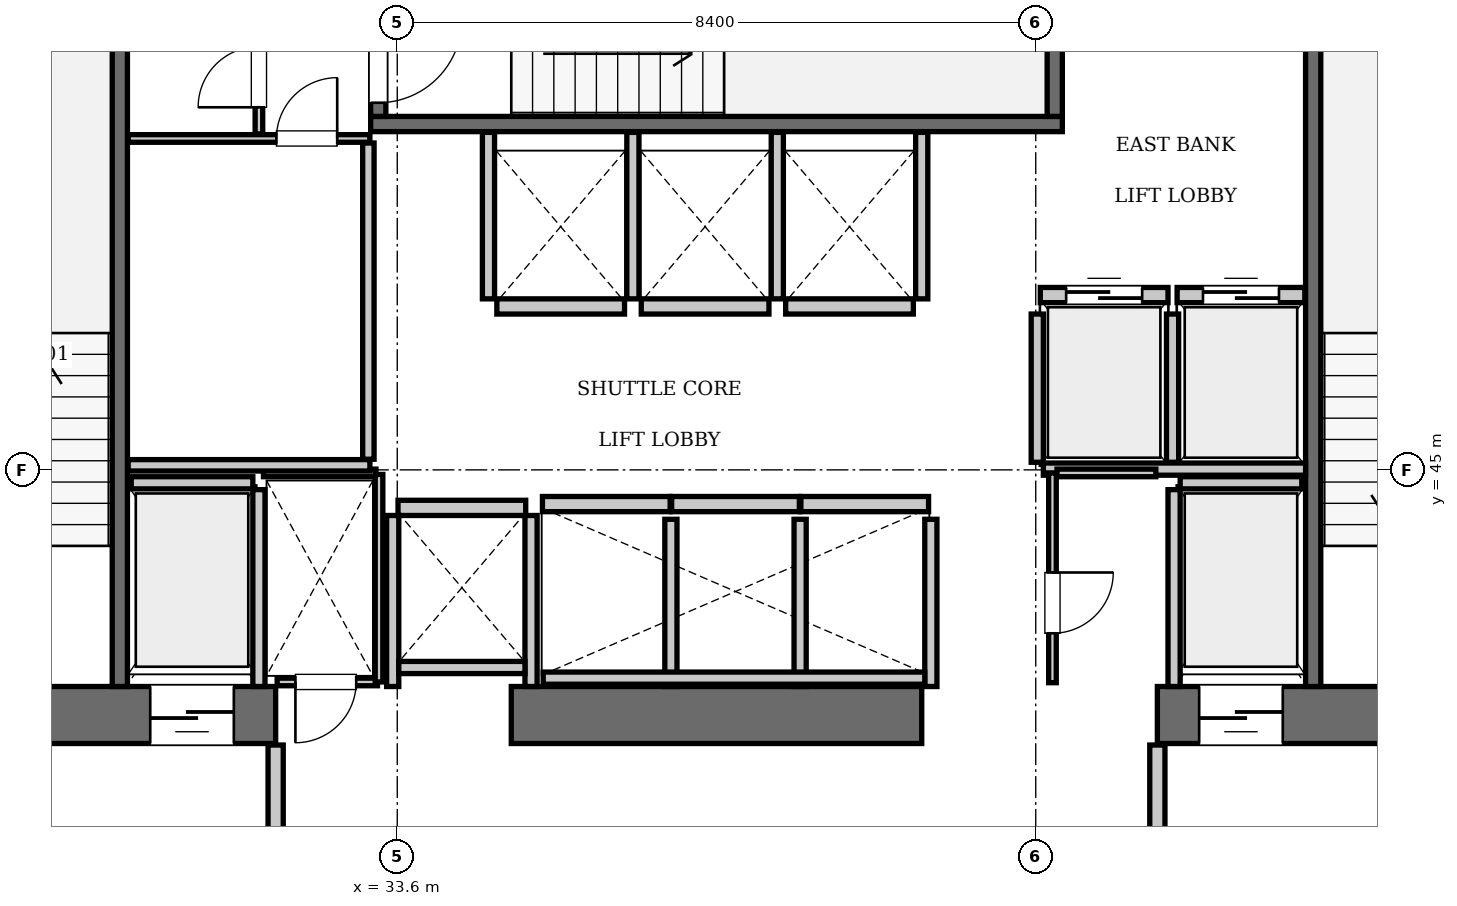
"""IFC4 building model, lengths in metres.
Left out: names, types, materials, properties, quantities, classifications, styles, units other than length and angle.
Written with IfcOpenShell. Run it as: python <this file> out.ifc"""

import sys

from ifc_helpers import new_model, si_unit, direction, frame, frame_2d, origin, place, context, subcontext, project, spatial, rectangle, extrude, element, fill, save


model = new_model("IFC4")
c1 = context("Model", 3, precision=1e-05, world=origin(), true_north=direction((0.0, 1.0)))
c2 = subcontext(c1, "Body", "Model", "MODEL_VIEW")
j1 = project(units=[si_unit("LENGTHUNIT", "METRE"), si_unit("PLANEANGLEUNIT", "RADIAN")], contexts=[c1])
p1 = place(None, origin())
s1 = spatial("IfcSite", under=j1, at=p1, CompositionType="ELEMENT")
p2 = place(p1, origin())
s2 = spatial("IfcBuilding", under=s1, at=p2, CompositionType="ELEMENT")
p3 = place(p2, frame((0.0, 0.0, 223.65)))
s3 = spatial("IfcBuildingStorey", under=s2, at=p3, CompositionType="ELEMENT", Elevation=223.65)
p4 = place(p3, frame((25.2, 41.775, 0.0), z_axis=(0.0, 0.0, 1.0), x_axis=(1.0, 0.0, 0.0)))
e1 = element("IfcWall", 1, at=p4, inside=s3, PredefinedType="SHEAR", context=c2, shape_type="SweptSolid", body=[
    extrude(rectangle(XDim=6.8, YDim=0.75, at=frame_2d((3.4, 0.0))), origin(), (0.0, 0.0, 1.0), 3.85),
])
p5 = place(p4, frame((1.65, 0.0, 0.0)))
e2 = element("IfcOpeningElement", 2, at=p5, cuts=e1, PredefinedType="OPENING", context=c2, shape_type="SweptSolid", body=[
    extrude(rectangle(XDim=1.15, YDim=2.15, at=frame_2d((0.575, 1.075))), frame((0.0, 0.385, 0.0), z_axis=(0.0, -1.0, 0.0), x_axis=(1.0, 0.0, 0.0)), (0.0, 0.0, 1.0), 0.77),
])
p6 = place(p4, frame((5.15, 0.0, 0.0)))
e3 = element("IfcOpeningElement", 3, at=p6, cuts=e1, PredefinedType="OPENING", context=c2, shape_type="SweptSolid", body=[
    extrude(rectangle(XDim=1.1, YDim=2.2, at=frame_2d((0.55, 1.1))), frame((0.0, 0.385, 0.0), z_axis=(0.0, -1.0, 0.0), x_axis=(1.0, 0.0, 0.0)), (0.0, 0.0, 1.0), 0.77),
])
p7 = place(p3, frame((35.1, 41.775, 0.0), z_axis=(0.0, 0.0, 1.0), x_axis=(1.0, 0.0, 0.0)))
e4 = element("IfcWall", 4, at=p7, inside=s3, PredefinedType="SHEAR", context=c2, shape_type="SweptSolid", body=[
    extrude(rectangle(XDim=5.4, YDim=0.75, at=frame_2d((2.7, 0.0))), origin(), (0.0, 0.0, 1.0), 3.85),
])
p8 = place(p3, frame((43.6, 41.775, 0.0), z_axis=(0.0, 0.0, 1.0), x_axis=(1.0, 0.0, 0.0)))
e5 = element("IfcWall", 5, at=p8, inside=s3, PredefinedType="SHEAR", context=c2, shape_type="SweptSolid", body=[
    extrude(rectangle(XDim=6.8, YDim=0.75, at=frame_2d((3.4, 0.0))), origin(), (0.0, 0.0, 1.0), 3.85),
])
p9 = place(p8, frame((3.9, 0.0, 0.0)))
e6 = element("IfcOpeningElement", 6, at=p9, cuts=e5, PredefinedType="OPENING", context=c2, shape_type="SweptSolid", body=[
    extrude(rectangle(XDim=1.15, YDim=2.15, at=frame_2d((0.575, 1.075))), frame((0.0, 0.385, 0.0), z_axis=(0.0, -1.0, 0.0), x_axis=(1.0, 0.0, 0.0)), (0.0, 0.0, 1.0), 0.77),
])
p10 = place(p8, frame((0.55, 0.0, 0.0)))
e7 = element("IfcOpeningElement", 7, at=p10, cuts=e5, PredefinedType="OPENING", context=c2, shape_type="SweptSolid", body=[
    extrude(rectangle(XDim=1.1, YDim=2.2, at=frame_2d((0.55, 1.1))), frame((0.0, 0.385, 0.0), z_axis=(0.0, -1.0, 0.0), x_axis=(1.0, 0.0, 0.0)), (0.0, 0.0, 1.0), 0.77),
])
p11 = place(p3, frame((29.95, 42.15, 0.0), z_axis=(0.0, 0.0, 1.0), x_axis=(0.0, 1.0, 0.0)))
e8 = element("IfcWall", 8, at=p11, inside=s3, PredefinedType="SOLIDWALL", context=c2, shape_type="SweptSolid", body=[
    extrude(rectangle(XDim=9.0, YDim=0.2, at=frame_2d((4.5, 0.0))), origin(), (0.0, 0.0, 1.0), 3.55),
])
p12 = place(p3, frame((33.25, 49.55, 0.0), z_axis=(0.0, 0.0, 1.0), x_axis=(1.0, 0.0, 0.0)))
e9 = element("IfcWall", 9, at=p12, inside=s3, PredefinedType="SOLIDWALL", context=c2, shape_type="SweptSolid", body=[
    extrude(rectangle(XDim=9.1, YDim=0.2, at=frame_2d((4.55, 0.0))), origin(), (0.0, 0.0, 1.0), 3.55),
])
p13 = place(p3, frame((42.25, 49.65, 0.0), z_axis=(0.0, 0.0, 1.0), x_axis=(0.0, 1.0, 0.0)))
e10 = element("IfcWall", 10, at=p13, inside=s3, PredefinedType="SOLIDWALL", context=c2, shape_type="SweptSolid", body=[
    extrude(rectangle(XDim=3.6, YDim=0.2, at=frame_2d((1.8, 0.0))), origin(), (0.0, 0.0, 1.0), 3.55),
])
p14 = place(p3, frame((33.35, 49.65, 0.0), z_axis=(0.0, 0.0, 1.0), x_axis=(0.0, 1.0, 0.0)))
e11 = element("IfcWall", 11, at=p14, inside=s3, PredefinedType="SOLIDWALL", context=c2, shape_type="SweptSolid", body=[
    extrude(rectangle(XDim=3.6, YDim=0.2, at=frame_2d((1.8, 0.0))), origin(), (0.0, 0.0, 1.0), 3.55),
])
p15 = place(p14, frame((0.18, 0.0, 0.0)))
e12 = element("IfcOpeningElement", 12, at=p15, cuts=e11, PredefinedType="OPENING", context=c2, shape_type="SweptSolid", body=[
    extrude(rectangle(XDim=1.1, YDim=2.15, at=frame_2d((0.55, 1.075))), frame((0.0, 0.11, 0.0), z_axis=(0.0, -1.0, 0.0), x_axis=(1.0, 0.0, 0.0)), (0.0, 0.0, 1.0), 0.22),
])
p16 = place(p3, frame((45.65, 42.15, 0.0), z_axis=(0.0, 0.0, 1.0), x_axis=(0.0, 1.0, 0.0)))
e13 = element("IfcWall", 13, at=p16, inside=s3, PredefinedType="SOLIDWALL", context=c2, shape_type="SweptSolid", body=[
    extrude(rectangle(XDim=9.0, YDim=0.2, at=frame_2d((4.5, 0.0))), origin(), (0.0, 0.0, 1.0), 3.55),
])
p17 = place(p3, frame((42.06, 47.3, 0.0), z_axis=(0.0, 0.0, 1.0), x_axis=(1.0, 0.0, 0.0)))
e14 = element("IfcWall", 14, at=p17, inside=s3, PredefinedType="SOLIDWALL", context=c2, shape_type="SweptSolid", body=[
    extrude(rectangle(XDim=1.68, YDim=0.2, at=frame_2d((0.84, 0.0))), origin(), (0.0, 0.0, 1.0), 3.55),
])
p18 = place(p17, frame((0.34, 0.0, 0.0)))
e15 = element("IfcOpeningElement", 15, at=p18, cuts=e14, PredefinedType="OPENING", context=c2, shape_type="SweptSolid", body=[
    extrude(rectangle(XDim=1.0, YDim=2.15, at=frame_2d((0.5, 1.075))), frame((0.0, 0.11, 0.0), z_axis=(0.0, -1.0, 0.0), x_axis=(1.0, 0.0, 0.0)), (0.0, 0.0, 1.0), 0.22),
])
p19 = place(p3, frame((43.86, 47.3, 0.0), z_axis=(0.0, 0.0, 1.0), x_axis=(1.0, 0.0, 0.0)))
e16 = element("IfcWall", 16, at=p19, inside=s3, PredefinedType="SOLIDWALL", context=c2, shape_type="SweptSolid", body=[
    extrude(rectangle(XDim=1.68, YDim=0.2, at=frame_2d((0.84, 0.0))), origin(), (0.0, 0.0, 1.0), 3.55),
])
p20 = place(p19, frame((0.34, 0.0, 0.0)))
e17 = element("IfcOpeningElement", 17, at=p20, cuts=e16, PredefinedType="OPENING", context=c2, shape_type="SweptSolid", body=[
    extrude(rectangle(XDim=1.0, YDim=2.15, at=frame_2d((0.5, 1.075))), frame((0.0, 0.11, 0.0), z_axis=(0.0, -1.0, 0.0), x_axis=(1.0, 0.0, 0.0)), (0.0, 0.0, 1.0), 0.22),
])
for number, where, z_axis, x_axis in (
    (18, (35.51, 44.55, 0.0), (0.0, 0.0, 1.0), (1.0, 0.0, 0.0)),
    (19, (37.21, 44.55, 0.0), (0.0, 0.0, 1.0), (1.0, 0.0, 0.0)),
):
    element("IfcWall", number, at=place(p3, frame(where, z_axis=z_axis, x_axis=x_axis)), inside=s3, PredefinedType="SOLIDWALL", context=c2, shape_type="SweptSolid", body=[
        extrude(rectangle(XDim=1.68, YDim=0.2, at=frame_2d((0.84, 0.0))), origin(), (0.0, 0.0, 1.0), 3.55),
    ])
for number, where, z_axis, x_axis in (
    (20, (38.91, 44.55, 0.0), (0.0, 0.0, 1.0), (1.0, 0.0, 0.0)),
    (21, (34.91, 47.15, 0.0), (0.0, 0.0, 1.0), (1.0, 0.0, 0.0)),
):
    element("IfcWall", number, at=place(p3, frame(where, z_axis=z_axis, x_axis=x_axis)), inside=s3, PredefinedType="SOLIDWALL", context=c2, shape_type="SweptSolid", body=[
        extrude(rectangle(XDim=1.68, YDim=0.2, at=frame_2d((0.84, 0.0))), origin(), (0.0, 0.0, 1.0), 3.55),
    ])
for number, where, z_axis, x_axis in (
    (22, (36.81, 47.15, 0.0), (0.0, 0.0, 1.0), (1.0, 0.0, 0.0)),
    (23, (38.71, 47.15, 0.0), (0.0, 0.0, 1.0), (1.0, 0.0, 0.0)),
    (24, (33.61, 44.5, 0.0), (0.0, 0.0, 1.0), (1.0, 0.0, 0.0)),
):
    element("IfcWall", number, at=place(p3, frame(where, z_axis=z_axis, x_axis=x_axis)), inside=s3, PredefinedType="SOLIDWALL", context=c2, shape_type="SweptSolid", body=[
        extrude(rectangle(XDim=1.68, YDim=0.2, at=frame_2d((0.84, 0.0))), origin(), (0.0, 0.0, 1.0), 3.55),
    ])
p21 = place(p3, frame((30.1, 44.83, 0.0), z_axis=(0.0, 0.0, 1.0), x_axis=(1.0, 0.0, 0.0)))
e25 = element("IfcWall", 25, at=p21, inside=s3, PredefinedType="SOLIDWALL", context=c2, shape_type="SweptSolid", body=[
    extrude(rectangle(XDim=1.6, YDim=0.16, at=frame_2d((0.8, 0.0))), origin(), (0.0, 0.0, 1.0), 3.55),
])
p22 = place(p3, frame((31.78, 42.15, 0.0), z_axis=(0.0, 0.0, 1.0), x_axis=(0.0, 1.0, 0.0)))
e26 = element("IfcWall", 26, at=p22, inside=s3, PredefinedType="SOLIDWALL", context=c2, shape_type="SweptSolid", body=[
    extrude(rectangle(XDim=2.59, YDim=0.16, at=frame_2d((1.295, 0.0))), origin(), (0.0, 0.0, 1.0), 3.55),
])
p23 = place(p3, frame((43.9, 44.83, 0.0), z_axis=(0.0, 0.0, 1.0), x_axis=(1.0, 0.0, 0.0)))
e27 = element("IfcWall", 27, at=p23, inside=s3, PredefinedType="SOLIDWALL", context=c2, shape_type="SweptSolid", body=[
    extrude(rectangle(XDim=1.6, YDim=0.16, at=frame_2d((0.8, 0.0))), origin(), (0.0, 0.0, 1.0), 3.55),
])
p24 = place(p3, frame((43.82, 42.15, 0.0), z_axis=(0.0, 0.0, 1.0), x_axis=(0.0, 1.0, 0.0)))
e28 = element("IfcWall", 28, at=p24, inside=s3, PredefinedType="SOLIDWALL", context=c2, shape_type="SweptSolid", body=[
    extrude(rectangle(XDim=2.59, YDim=0.16, at=frame_2d((1.295, 0.0))), origin(), (0.0, 0.0, 1.0), 3.55),
])
for number, where, z_axis, x_axis in (
    (29, (42.02, 45.1, 0.0), (0.0, 0.0, 1.0), (0.0, 1.0, 0.0)),
    (30, (43.8, 45.1, 0.0), (0.0, 0.0, 1.0), (0.0, 1.0, 0.0)),
):
    element("IfcWall", number, at=place(p3, frame(where, z_axis=z_axis, x_axis=x_axis)), inside=s3, PredefinedType="SOLIDWALL", context=c2, shape_type="SweptSolid", body=[
        extrude(rectangle(XDim=1.95, YDim=0.16, at=frame_2d((0.975, 0.0))), origin(), (0.0, 0.0, 1.0), 3.55),
    ])
p25 = place(p3, frame((42.1, 45.01, 0.0), z_axis=(0.0, 0.0, 1.0), x_axis=(1.0, 0.0, 0.0)))
e31 = element("IfcWall", 31, at=p25, inside=s3, PredefinedType="SOLIDWALL", context=c2, shape_type="SweptSolid", body=[
    extrude(rectangle(XDim=3.45, YDim=0.16, at=frame_2d((1.725, 0.0))), origin(), (0.0, 0.0, 1.0), 3.55),
])
for number, where, z_axis, x_axis in (
    (32, (37.2, 42.15, 0.0), (0.0, 0.0, 1.0), (0.0, 1.0, 0.0)),
    (33, (38.9, 42.15, 0.0), (0.0, 0.0, 1.0), (0.0, 1.0, 0.0)),
    (34, (40.62, 42.15, 0.0), (0.0, 0.0, 1.0), (0.0, 1.0, 0.0)),
):
    element("IfcWall", number, at=place(p3, frame(where, z_axis=z_axis, x_axis=x_axis)), inside=s3, PredefinedType="SOLIDWALL", context=c2, shape_type="SweptSolid", body=[
        extrude(rectangle(XDim=2.2, YDim=0.16, at=frame_2d((1.1, 0.0))), origin(), (0.0, 0.0, 1.0), 3.55),
    ])
p26 = place(p3, frame((35.52, 42.26, 0.0), z_axis=(0.0, 0.0, 1.0), x_axis=(1.0, 0.0, 0.0)))
e35 = element("IfcWall", 35, at=p26, inside=s3, PredefinedType="SOLIDWALL", context=c2, shape_type="SweptSolid", body=[
    extrude(rectangle(XDim=5.02, YDim=0.16, at=frame_2d((2.51, 0.0))), origin(), (0.0, 0.0, 1.0), 3.55),
])
for number, where, z_axis, x_axis in (
    (36, (34.8, 47.25, 0.0), (0.0, 0.0, 1.0), (0.0, 1.0, 0.0)),
    (37, (36.7, 47.25, 0.0), (0.0, 0.0, 1.0), (0.0, 1.0, 0.0)),
    (38, (38.6, 47.25, 0.0), (0.0, 0.0, 1.0), (0.0, 1.0, 0.0)),
    (39, (40.5, 47.25, 0.0), (0.0, 0.0, 1.0), (0.0, 1.0, 0.0)),
):
    element("IfcWall", number, at=place(p3, frame(where, z_axis=z_axis, x_axis=x_axis)), inside=s3, PredefinedType="SOLIDWALL", context=c2, shape_type="SweptSolid", body=[
        extrude(rectangle(XDim=2.19, YDim=0.16, at=frame_2d((1.095, 0.0))), origin(), (0.0, 0.0, 1.0), 3.55),
    ])
for number, where, z_axis, x_axis in (
    (40, (33.54, 42.15, 0.0), (0.0, 0.0, 1.0), (0.0, 1.0, 0.0)),
    (41, (35.36, 42.15, 0.0), (0.0, 0.0, 1.0), (0.0, 1.0, 0.0)),
):
    element("IfcWall", number, at=place(p3, frame(where, z_axis=z_axis, x_axis=x_axis)), inside=s3, PredefinedType="SOLIDWALL", context=c2, shape_type="SweptSolid", body=[
        extrude(rectangle(XDim=2.25, YDim=0.16, at=frame_2d((1.125, 0.0))), origin(), (0.0, 0.0, 1.0), 3.55),
    ])
p27 = place(p3, frame((33.62, 42.4, 0.0), z_axis=(0.0, 0.0, 1.0), x_axis=(1.0, 0.0, 0.0)))
e42 = element("IfcWall", 42, at=p27, inside=s3, PredefinedType="SOLIDWALL", context=c2, shape_type="SweptSolid", body=[
    extrude(rectangle(XDim=1.66, YDim=0.16, at=frame_2d((0.83, 0.0))), origin(), (0.0, 0.0, 1.0), 3.55),
])
for number, where, z_axis, x_axis in (
    (43, (32.0, 38.31, 0.0), (0.0, 0.0, 1.0), (0.0, 1.0, 0.0)),
    (44, (43.6, 38.31, 0.0), (0.0, 0.0, 1.0), (0.0, 1.0, 0.0)),
):
    element("IfcWall", number, at=place(p3, frame(where, z_axis=z_axis, x_axis=x_axis)), inside=s3, PredefinedType="PARTITIONING", context=c2, shape_type="SweptSolid", body=[
        extrude(rectangle(XDim=3.07, YDim=0.2, at=frame_2d((1.535, 0.0))), origin(), (0.0, 0.0, 1.0), 3.55),
    ])
p28 = place(p3, frame((32.02, 42.21, 0.0), z_axis=(0.0, 0.0, 1.0), x_axis=(1.0, 0.0, 0.0)))
e45 = element("IfcWall", 45, at=p28, inside=s3, PredefinedType="PARTITIONING", context=c2, shape_type="SweptSolid", body=[
    extrude(rectangle(XDim=1.32, YDim=0.1, at=frame_2d((0.66, 0.0))), origin(), (0.0, 0.0, 1.0), 3.55),
])
p29 = place(p28, frame((0.24, 0.0, 0.0)))
e46 = element("IfcOpeningElement", 46, at=p29, cuts=e45, PredefinedType="OPENING", context=c2, shape_type="SweptSolid", body=[
    extrude(rectangle(XDim=0.8, YDim=2.05, at=frame_2d((0.4, 1.025))), frame((0.0, 0.06, 0.0), z_axis=(0.0, -1.0, 0.0), x_axis=(1.0, 0.0, 0.0)), (0.0, 0.0, 1.0), 0.12),
])
p30 = place(p3, frame((31.84, 44.96, 0.0), z_axis=(0.0, 0.0, 1.0), x_axis=(1.0, 0.0, 0.0)))
e47 = element("IfcWall", 47, at=p30, inside=s3, PredefinedType="PARTITIONING", context=c2, shape_type="SweptSolid", body=[
    extrude(rectangle(XDim=1.48, YDim=0.1, at=frame_2d((0.74, 0.0))), origin(), (0.0, 0.0, 1.0), 3.55),
])
p31 = place(p3, frame((33.36, 42.21, 0.0), z_axis=(0.0, 0.0, 1.0), x_axis=(0.0, 1.0, 0.0)))
e48 = element("IfcWall", 48, at=p31, inside=s3, PredefinedType="PARTITIONING", context=c2, shape_type="SweptSolid", body=[
    extrude(rectangle(XDim=2.73, YDim=0.1, at=frame_2d((1.365, 0.0))), origin(), (0.0, 0.0, 1.0), 3.55),
])
p32 = place(p3, frame((42.22, 42.2, 0.0), z_axis=(0.0, 0.0, 1.0), x_axis=(0.0, 1.0, 0.0)))
e49 = element("IfcWall", 49, at=p32, inside=s3, PredefinedType="PARTITIONING", context=c2, shape_type="SweptSolid", body=[
    extrude(rectangle(XDim=2.76, YDim=0.1, at=frame_2d((1.38, 0.0))), origin(), (0.0, 0.0, 1.0), 3.55),
])
p33 = place(p32, frame((0.65, 0.0, 0.0)))
e50 = element("IfcOpeningElement", 50, at=p33, cuts=e49, PredefinedType="OPENING", context=c2, shape_type="SweptSolid", body=[
    extrude(rectangle(XDim=0.8, YDim=2.05, at=frame_2d((0.4, 1.025))), frame((0.0, 0.06, 0.0), z_axis=(0.0, -1.0, 0.0), x_axis=(1.0, 0.0, 0.0)), (0.0, 0.0, 1.0), 0.12),
])
p34 = place(p3, frame((42.28, 44.96, 0.0), z_axis=(0.0, 0.0, 1.0), x_axis=(1.0, 0.0, 0.0)))
e51 = element("IfcWall", 51, at=p34, inside=s3, PredefinedType="PARTITIONING", context=c2, shape_type="SweptSolid", body=[
    extrude(rectangle(XDim=1.3, YDim=0.1, at=frame_2d((0.65, 0.0))), origin(), (0.0, 0.0, 1.0), 3.55),
])
p35 = place(p3, frame((30.06, 45.06, 0.0), z_axis=(0.0, 0.0, 1.0), x_axis=(1.0, 0.0, 0.0)))
e52 = element("IfcWall", 52, at=p35, inside=s3, PredefinedType="PARTITIONING", context=c2, shape_type="SweptSolid", body=[
    extrude(rectangle(XDim=3.18, YDim=0.15, at=frame_2d((1.59, 0.0))), origin(), (0.0, 0.0, 1.0), 3.55),
])
p36 = place(p3, frame((33.22, 45.14, 0.0), z_axis=(0.0, 0.0, 1.0), x_axis=(0.0, 1.0, 0.0)))
e53 = element("IfcWall", 53, at=p36, inside=s3, PredefinedType="PARTITIONING", context=c2, shape_type="SweptSolid", body=[
    extrude(rectangle(XDim=4.16, YDim=0.15, at=frame_2d((2.08, 0.0))), origin(), (0.0, 0.0, 1.0), 3.55),
])
p37 = place(p3, frame((30.06, 49.36, 0.0), z_axis=(0.0, 0.0, 1.0), x_axis=(1.0, 0.0, 0.0)))
e54 = element("IfcWall", 54, at=p37, inside=s3, PredefinedType="PARTITIONING", context=c2, shape_type="SweptSolid", body=[
    extrude(rectangle(XDim=3.18, YDim=0.1, at=frame_2d((1.59, 0.0))), origin(), (0.0, 0.0, 1.0), 3.55),
])
p38 = place(p37, frame((1.95, 0.0, 0.0)))
e55 = element("IfcOpeningElement", 55, at=p38, cuts=e54, PredefinedType="OPENING", context=c2, shape_type="SweptSolid", body=[
    extrude(rectangle(XDim=0.8, YDim=2.05, at=frame_2d((0.4, 1.025))), frame((0.0, 0.06, 0.0), z_axis=(0.0, -1.0, 0.0), x_axis=(1.0, 0.0, 0.0)), (0.0, 0.0, 1.0), 0.12),
])
p39 = place(p3, frame((31.78, 49.42, 0.0), z_axis=(0.0, 0.0, 1.0), x_axis=(0.0, 1.0, 0.0)))
e56 = element("IfcWall", 56, at=p39, inside=s3, PredefinedType="PARTITIONING", context=c2, shape_type="SweptSolid", body=[
    extrude(rectangle(XDim=1.68, YDim=0.1, at=frame_2d((0.84, 0.0))), origin(), (0.0, 0.0, 1.0), 3.55),
])
p40 = place(p39, frame((0.35, 0.0, 0.0)))
e57 = element("IfcOpeningElement", 57, at=p40, cuts=e56, PredefinedType="OPENING", context=c2, shape_type="SweptSolid", body=[
    extrude(rectangle(XDim=0.8, YDim=2.05, at=frame_2d((0.4, 1.025))), frame((0.0, 0.06, 0.0), z_axis=(0.0, -1.0, 0.0), x_axis=(1.0, 0.0, 0.0)), (0.0, 0.0, 1.0), 0.12),
])
p41 = place(p15, frame((1.1, 0.0, 0.0), z_axis=(0.0, 0.0, 1.0), x_axis=(-1.0, 0.0, 0.0)))
e58 = element("IfcDoor", 58, at=p41, inside=s3, OperationType="SINGLE_SWING_LEFT", PredefinedType="DOOR", context=c2, shape_type="SweptSolid", body=[
    extrude(rectangle(XDim=1.1, YDim=2.15, at=frame_2d((0.55, 1.075))), frame((0.0, 0.025, 0.0), z_axis=(0.0, -1.0, 0.0), x_axis=(1.0, 0.0, 0.0)), (0.0, 0.0, 1.0), 0.05),
])
fill(e12, e58)
p42 = place(p18, origin())
e59 = element("IfcDoor", 59, at=p42, inside=s3, OperationType="SLIDING_TO_LEFT", PredefinedType="DOOR", context=c2, shape_type="SweptSolid", body=[
    extrude(rectangle(XDim=1.0, YDim=2.15, at=frame_2d((0.5, 1.075))), frame((0.0, 0.025, 0.0), z_axis=(0.0, -1.0, 0.0), x_axis=(1.0, 0.0, 0.0)), (0.0, 0.0, 1.0), 0.05),
])
fill(e15, e59)
p43 = place(p20, origin())
e60 = element("IfcDoor", 60, at=p43, inside=s3, OperationType="SLIDING_TO_LEFT", PredefinedType="DOOR", context=c2, shape_type="SweptSolid", body=[
    extrude(rectangle(XDim=1.0, YDim=2.15, at=frame_2d((0.5, 1.075))), frame((0.0, 0.025, 0.0), z_axis=(0.0, -1.0, 0.0), x_axis=(1.0, 0.0, 0.0)), (0.0, 0.0, 1.0), 0.05),
])
fill(e17, e60)
p44 = place(p6, frame((1.1, 0.0, 0.0), z_axis=(0.0, 0.0, 1.0), x_axis=(-1.0, 0.0, 0.0)))
e61 = element("IfcDoor", 61, at=p44, inside=s3, OperationType="SLIDING_TO_LEFT", PredefinedType="DOOR", context=c2, shape_type="SweptSolid", body=[
    extrude(rectangle(XDim=1.1, YDim=2.2, at=frame_2d((0.55, 1.1))), frame((0.0, 0.025, 0.0), z_axis=(0.0, -1.0, 0.0), x_axis=(1.0, 0.0, 0.0)), (0.0, 0.0, 1.0), 0.05),
])
fill(e3, e61)
p45 = place(p10, frame((1.1, 0.0, 0.0), z_axis=(0.0, 0.0, 1.0), x_axis=(-1.0, 0.0, 0.0)))
e62 = element("IfcDoor", 62, at=p45, inside=s3, OperationType="SLIDING_TO_LEFT", PredefinedType="DOOR", context=c2, shape_type="SweptSolid", body=[
    extrude(rectangle(XDim=1.1, YDim=2.2, at=frame_2d((0.55, 1.1))), frame((0.0, 0.025, 0.0), z_axis=(0.0, -1.0, 0.0), x_axis=(1.0, 0.0, 0.0)), (0.0, 0.0, 1.0), 0.05),
])
fill(e7, e62)
p46 = place(p29, frame((0.8, 0.0, 0.0), z_axis=(0.0, 0.0, 1.0), x_axis=(-1.0, 0.0, 0.0)))
e63 = element("IfcDoor", 63, at=p46, inside=s3, OperationType="SINGLE_SWING_RIGHT", PredefinedType="DOOR", context=c2, shape_type="SweptSolid", body=[
    extrude(rectangle(XDim=0.8, YDim=2.05, at=frame_2d((0.4, 1.025))), frame((0.0, 0.025, 0.0), z_axis=(0.0, -1.0, 0.0), x_axis=(1.0, 0.0, 0.0)), (0.0, 0.0, 1.0), 0.05),
])
fill(e46, e63)
p47 = place(p33, frame((0.8, 0.0, 0.0), z_axis=(0.0, 0.0, 1.0), x_axis=(-1.0, 0.0, 0.0)))
e64 = element("IfcDoor", 64, at=p47, inside=s3, OperationType="SINGLE_SWING_LEFT", PredefinedType="DOOR", context=c2, shape_type="SweptSolid", body=[
    extrude(rectangle(XDim=0.8, YDim=2.05, at=frame_2d((0.4, 1.025))), frame((0.0, 0.025, 0.0), z_axis=(0.0, -1.0, 0.0), x_axis=(1.0, 0.0, 0.0)), (0.0, 0.0, 1.0), 0.05),
])
fill(e50, e64)
p48 = place(p38, origin())
e65 = element("IfcDoor", 65, at=p48, inside=s3, OperationType="SINGLE_SWING_RIGHT", PredefinedType="DOOR", context=c2, shape_type="SweptSolid", body=[
    extrude(rectangle(XDim=0.8, YDim=2.05, at=frame_2d((0.4, 1.025))), frame((0.0, 0.025, 0.0), z_axis=(0.0, -1.0, 0.0), x_axis=(1.0, 0.0, 0.0)), (0.0, 0.0, 1.0), 0.05),
])
fill(e55, e65)
p49 = place(p40, origin())
e66 = element("IfcDoor", 66, at=p49, inside=s3, OperationType="SINGLE_SWING_LEFT", PredefinedType="DOOR", context=c2, shape_type="SweptSolid", body=[
    extrude(rectangle(XDim=0.8, YDim=2.05, at=frame_2d((0.4, 1.025))), frame((0.0, 0.025, 0.0), z_axis=(0.0, -1.0, 0.0), x_axis=(1.0, 0.0, 0.0)), (0.0, 0.0, 1.0), 0.05),
])
fill(e57, e66)
save(model, sys.argv[1])
